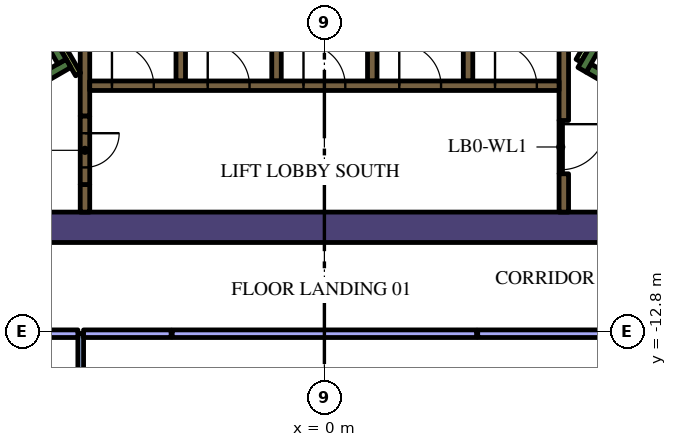
"""IFC4 building model, lengths in metres.
Left out: names, types, materials, properties, quantities, classifications, styles, units other than length and angle.
Written with IfcOpenShell. Run it as: python <this file> out.ifc"""

import sys

from ifc_helpers import new_model, si_unit, direction, frame, frame_2d, origin, place, context, subcontext, project, spatial, rectangle, extrude, element, fill, save


model = new_model("IFC4")
c1 = context("Model", 3, precision=1e-05, world=origin(), true_north=direction((0.0, 1.0)))
c2 = subcontext(c1, "Body", "Model", "MODEL_VIEW")
j1 = project(units=[si_unit("LENGTHUNIT", "METRE"), si_unit("PLANEANGLEUNIT", "RADIAN")], contexts=[c1])
p1 = place(None, origin())
s1 = spatial("IfcSite", under=j1, at=p1, CompositionType="ELEMENT")
p2 = place(p1, origin())
s2 = spatial("IfcBuilding", under=s1, at=p2, CompositionType="ELEMENT")
p3 = place(p2, frame((0.0, 0.0, 166.8)))
s3 = spatial("IfcBuildingStorey", under=s2, at=p3, CompositionType="ELEMENT", Elevation=166.8)
p4 = place(p3, frame((-13.378, -10.05, 0.0), z_axis=(0.0, 0.0, 1.0), x_axis=(1.0, 0.0, 0.0)))
e1 = element("IfcWall", 1, at=p4, inside=s3, PredefinedType="SOLIDWALL", context=c2, shape_type="SweptSolid", body=[
    extrude(rectangle(XDim=22.282, YDim=0.8, at=frame_2d((11.141, 0.0))), origin(), (0.0, 0.0, 1.0), 4.2),
])
p5 = place(p3, frame((12.84, -9.261, 0.0), z_axis=(0.0, 0.0, 1.0), x_axis=(-0.866013990052, 0.500019768644, 0.0)))
e2 = element("IfcWall", 2, at=p5, inside=s3, PredefinedType="SOLIDWALL", context=c2, shape_type="SweptSolid", body=[
    extrude(rectangle(XDim=6.8, YDim=0.25, at=frame_2d((3.4, 0.0))), origin(), (0.0, 0.0, 1.0), 4.2),
])
p6 = place(p3, frame((6.78, -5.906, 0.0), z_axis=(0.0, 0.0, 1.0), x_axis=(0.500223362819, 0.865896406789, 0.0)))
e3 = element("IfcWall", 3, at=p6, inside=s3, PredefinedType="SOLIDWALL", context=c2, shape_type="SweptSolid", body=[
    extrude(rectangle(XDim=0.675, YDim=0.25, at=frame_2d((0.337, 0.0))), origin(), (0.0, 0.0, 1.0), 4.2),
])
p7 = place(p3, frame((-12.84, -9.261, 0.0), z_axis=(0.0, 0.0, 1.0), x_axis=(0.866016039709, 0.500016218704, 0.0)))
e4 = element("IfcWall", 4, at=p7, inside=s3, PredefinedType="SOLIDWALL", context=c2, shape_type="SweptSolid", body=[
    extrude(rectangle(XDim=7.05, YDim=0.25, at=frame_2d((3.525, 0.0))), origin(), (0.0, 0.0, 1.0), 4.2),
])
p8 = place(p3, frame((-6.905, -5.69, 0.0), z_axis=(0.0, 0.0, 1.0), x_axis=(-0.500402024738, 0.865793170242, 0.0)))
e5 = element("IfcWall", 5, at=p8, inside=s3, PredefinedType="SOLIDWALL", context=c2, shape_type="SweptSolid", body=[
    extrude(rectangle(XDim=0.425, YDim=0.25, at=frame_2d((0.212, 0.0))), origin(), (0.0, 0.0, 1.0), 4.2),
])
p9 = place(p3, frame((-6.3, -8.925, 0.0), z_axis=(0.0, 0.0, 1.0), x_axis=(0.0, -1.0, 0.0)))
e6 = element("IfcWall", 6, at=p9, inside=s3, PredefinedType="SOLIDWALL", context=c2, shape_type="SweptSolid", body=[
    extrude(rectangle(XDim=0.725, YDim=0.25, at=frame_2d((0.363, 0.0))), origin(), (0.0, 0.0, 1.0), 4.2),
])
p10 = place(p3, frame((6.3, -7.24, 0.0), z_axis=(0.0, 0.0, 1.0), x_axis=(0.0, 1.0, 0.0)))
e7 = element("IfcWall", 7, at=p10, inside=s3, PredefinedType="SOLIDWALL", context=c2, shape_type="SweptSolid", body=[
    extrude(rectangle(XDim=3.24, YDim=0.25, at=frame_2d((1.62, 0.0))), origin(), (0.0, 0.0, 1.0), 4.2),
])
p11 = place(p3, frame((6.3, -9.65, 0.0), z_axis=(0.0, 0.0, 1.0), x_axis=(0.0, 1.0, 0.0)))
e8 = element("IfcWall", 8, at=p11, inside=s3, PredefinedType="SOLIDWALL", context=c2, shape_type="SweptSolid", body=[
    extrude(rectangle(XDim=1.008, YDim=0.25, at=frame_2d((0.504, 0.0))), origin(), (0.0, 0.0, 1.0), 4.2),
])
for number, where, z_axis, x_axis in (
    (9, (3.78, -4.0, 0.0), (0.0, 0.0, 1.0), (0.0, -1.0, 0.0)),
    (10, (1.26, -4.0, 0.0), (0.0, 0.0, 1.0), (0.0, -1.0, 0.0)),
    (11, (-1.26, -4.0, 0.0), (0.0, 0.0, 1.0), (0.0, -1.0, 0.0)),
    (12, (-3.78, -4.0, 0.0), (0.0, 0.0, 1.0), (0.0, -1.0, 0.0)),
):
    element("IfcWall", number, at=place(p3, frame(where, z_axis=z_axis, x_axis=x_axis)), inside=s3, PredefinedType="SOLIDWALL", context=c2, shape_type="SweptSolid", body=[
        extrude(rectangle(XDim=2.2, YDim=0.25, at=frame_2d((1.1, 0.0))), origin(), (0.0, 0.0, 1.0), 4.2),
    ])
p12 = place(p3, frame((-6.3, -7.125, 0.0), z_axis=(0.0, 0.0, 1.0), x_axis=(0.0, 1.0, 0.0)))
e13 = element("IfcWall", 13, at=p12, inside=s3, PredefinedType="SOLIDWALL", context=c2, shape_type="SweptSolid", body=[
    extrude(rectangle(XDim=3.125, YDim=0.25, at=frame_2d((1.562, 0.0))), origin(), (0.0, 0.0, 1.0), 4.2),
])
p13 = place(p3, frame((-6.48, -6.027, 0.0), z_axis=(0.0, 0.0, 1.0), x_axis=(-0.499927229454, 0.866067413802, 0.0)))
e14 = element("IfcWall", 14, at=p13, inside=s3, PredefinedType="PARTITIONING", context=c2, shape_type="SweptSolid", body=[
    extrude(rectangle(XDim=0.929, YDim=0.15, at=frame_2d((0.464, 0.0))), origin(), (0.0, 0.0, 1.0), 4.2),
])
p14 = place(p3, frame((6.945, -5.222, 0.0), z_axis=(0.0, 0.0, 1.0), x_axis=(-0.499818422106, -0.866130212453, 0.0)))
e15 = element("IfcWall", 15, at=p14, inside=s3, PredefinedType="PARTITIONING", context=c2, shape_type="SweptSolid", body=[
    extrude(rectangle(XDim=0.514, YDim=0.15, at=frame_2d((0.257, 0.0))), origin(), (0.0, 0.0, 1.0), 3.15),
])
p15 = place(p3, frame((-6.175, -6.325, 0.0), z_axis=(0.0, 0.0, 1.0), x_axis=(1.0, 0.0, 0.0)))
e16 = element("IfcWall", 16, at=p15, inside=s3, PredefinedType="SOLIDWALL", context=c2, shape_type="SweptSolid", body=[
    extrude(rectangle(XDim=12.35, YDim=0.25, at=frame_2d((6.175, 0.0))), origin(), (0.0, 0.0, 1.0), 4.2),
])
p16 = place(p15, frame((0.585, 0.0, 0.0)))
e17 = element("IfcOpeningElement", 17, at=p16, cuts=e16, PredefinedType="OPENING", context=c2, shape_type="SweptSolid", body=[
    extrude(rectangle(XDim=1.1, YDim=2.1, at=frame_2d((0.55, 1.05))), frame((0.0, 0.135, 0.0), z_axis=(0.0, -1.0, 0.0), x_axis=(1.0, 0.0, 0.0)), (0.0, 0.0, 1.0), 0.27),
])
p17 = place(p15, frame((3.105, 0.0, 0.0)))
e18 = element("IfcOpeningElement", 18, at=p17, cuts=e16, PredefinedType="OPENING", context=c2, shape_type="SweptSolid", body=[
    extrude(rectangle(XDim=1.1, YDim=2.1, at=frame_2d((0.55, 1.05))), frame((0.0, 0.135, 0.0), z_axis=(0.0, -1.0, 0.0), x_axis=(1.0, 0.0, 0.0)), (0.0, 0.0, 1.0), 0.27),
])
p18 = place(p15, frame((5.625, 0.0, 0.0)))
e19 = element("IfcOpeningElement", 19, at=p18, cuts=e16, PredefinedType="OPENING", context=c2, shape_type="SweptSolid", body=[
    extrude(rectangle(XDim=1.1, YDim=2.1, at=frame_2d((0.55, 1.05))), frame((0.0, 0.135, 0.0), z_axis=(0.0, -1.0, 0.0), x_axis=(1.0, 0.0, 0.0)), (0.0, 0.0, 1.0), 0.27),
])
p19 = place(p15, frame((8.145, 0.0, 0.0)))
e20 = element("IfcOpeningElement", 20, at=p19, cuts=e16, PredefinedType="OPENING", context=c2, shape_type="SweptSolid", body=[
    extrude(rectangle(XDim=1.1, YDim=2.1, at=frame_2d((0.55, 1.05))), frame((0.0, 0.135, 0.0), z_axis=(0.0, -1.0, 0.0), x_axis=(1.0, 0.0, 0.0)), (0.0, 0.0, 1.0), 0.27),
])
p20 = place(p15, frame((10.665, 0.0, 0.0)))
e21 = element("IfcOpeningElement", 21, at=p20, cuts=e16, PredefinedType="OPENING", context=c2, shape_type="SweptSolid", body=[
    extrude(rectangle(XDim=1.1, YDim=2.1, at=frame_2d((0.55, 1.05))), frame((0.0, 0.135, 0.0), z_axis=(0.0, -1.0, 0.0), x_axis=(1.0, 0.0, 0.0)), (0.0, 0.0, 1.0), 0.27),
])
p21 = place(p3, frame((-6.3, -7.125, 0.0), z_axis=(0.0, 0.0, 1.0), x_axis=(0.0, -1.0, 0.0)))
e22 = element("IfcWall", 22, at=p21, inside=s3, PredefinedType="SOLIDWALL", context=c2, shape_type="SweptSolid", body=[
    extrude(rectangle(XDim=1.8, YDim=0.25, at=frame_2d((0.9, 0.0))), origin(), (0.0, 0.0, 1.0), 4.2),
])
p22 = place(p21, frame((0.45, 0.0, 0.0)))
e23 = element("IfcOpeningElement", 23, at=p22, cuts=e22, PredefinedType="OPENING", context=c2, shape_type="SweptSolid", body=[
    extrude(rectangle(XDim=0.9, YDim=2.1, at=frame_2d((0.45, 1.05))), frame((0.0, 0.135, 0.0), z_axis=(0.0, -1.0, 0.0), x_axis=(1.0, 0.0, 0.0)), (0.0, 0.0, 1.0), 0.27),
])
p23 = place(p3, frame((6.22, -7.237, 0.0), z_axis=(0.0, 0.0, 1.0), x_axis=(0.0, -1.0, 0.0)))
e24 = element("IfcWall", 24, at=p23, inside=s3, PredefinedType="PARTITIONING", context=c2, shape_type="SweptSolid", body=[
    extrude(rectangle(XDim=1.4, YDim=0.09, at=frame_2d((0.7, 0.0))), origin(), (0.0, 0.0, 1.0), 3.15),
])
p24 = place(p23, frame((0.1, 0.0, 0.0)))
e25 = element("IfcOpeningElement", 25, at=p24, cuts=e24, PredefinedType="OPENING", context=c2, shape_type="SweptSolid", body=[
    extrude(rectangle(XDim=1.2, YDim=2.1, at=frame_2d((0.6, 1.05))), frame((0.0, 0.055, 0.0), z_axis=(0.0, -1.0, 0.0), x_axis=(1.0, 0.0, 0.0)), (0.0, 0.0, 1.0), 0.11),
])
p25 = place(p3, frame((-6.412, -16.672, 0.0), z_axis=(0.0, 0.0, 1.0), x_axis=(0.0, 1.0, 0.0)))
e26 = element("IfcWall", 26, at=p25, inside=s3, PredefinedType="PARTITIONING", context=c2, shape_type="SweptSolid", body=[
    extrude(rectangle(XDim=3.822, YDim=0.15, at=frame_2d((1.911, 0.0))), origin(), (0.0, 0.0, 1.0), 3.15),
])
p26 = place(p25, frame((1.422, 0.0, 0.0)))
e27 = element("IfcOpeningElement", 27, at=p26, cuts=e26, PredefinedType="OPENING", context=c2, shape_type="SweptSolid", body=[
    extrude(rectangle(XDim=0.9, YDim=2.1, at=frame_2d((0.45, 1.05))), frame((0.0, 0.085, 0.0), z_axis=(0.0, -1.0, 0.0), x_axis=(1.0, 0.0, 0.0)), (0.0, 0.0, 1.0), 0.17),
])
p27 = place(p3, frame((-14.721, -12.85, 0.0), z_axis=(0.0, 0.0, 1.0), x_axis=(1.0, 0.0, 0.0)))
e28 = element("IfcWall", 28, at=p27, inside=s3, PredefinedType="PARTITIONING", context=c2, shape_type="SweptSolid", body=[
    extrude(rectangle(XDim=8.234, YDim=0.2, at=frame_2d((4.117, 0.0))), origin(), (0.0, 0.0, 1.0), 3.15),
])
p28 = place(p3, frame((-4.004, -12.85, 0.0), z_axis=(0.0, 0.0, 1.0), x_axis=(1.0, 0.0, 0.0)))
e29 = element("IfcWall", 29, at=p28, inside=s3, PredefinedType="PARTITIONING", context=c2, shape_type="SweptSolid", body=[
    extrude(rectangle(XDim=8.008, YDim=0.2, at=frame_2d((4.004, 0.0))), origin(), (0.0, 0.0, 1.0), 3.15),
])
p29 = place(p3, frame((-6.337, -12.85, 0.0), z_axis=(0.0, 0.0, 1.0), x_axis=(1.0, 0.0, 0.0)))
e30 = element("IfcWall", 30, at=p29, inside=s3, PredefinedType="PARTITIONING", context=c2, shape_type="SweptSolid", body=[
    extrude(rectangle(XDim=2.303, YDim=0.2, at=frame_2d((1.151, 0.0))), origin(), (0.0, 0.0, 1.0), 3.15),
])
p30 = place(p3, frame((4.034, -12.85, 0.0), z_axis=(0.0, 0.0, 1.0), x_axis=(1.0, 0.0, 0.0)))
e31 = element("IfcWall", 31, at=p30, inside=s3, PredefinedType="PARTITIONING", context=c2, shape_type="SweptSolid", body=[
    extrude(rectangle(XDim=10.717, YDim=0.2, at=frame_2d((5.359, 0.0))), origin(), (0.0, 0.0, 1.0), 3.15),
])
p31 = place(p30, frame((4.9, 0.0, 0.0)))
e32 = element("IfcOpeningElement", 32, at=p31, cuts=e31, PredefinedType="OPENING", context=c2, shape_type="SweptSolid", body=[
    extrude(rectangle(XDim=1.0, YDim=2.1, at=frame_2d((0.5, 1.05))), frame((0.0, 0.11, 0.0), z_axis=(0.0, -1.0, 0.0), x_axis=(1.0, 0.0, 0.0)), (0.0, 0.0, 1.0), 0.22),
])
p32 = place(p16, origin())
e33 = element("IfcDoor", 33, at=p32, inside=s3, OperationType="DOUBLE_DOOR_SLIDING", PredefinedType="DOOR", context=c2, shape_type="SweptSolid", body=[
    extrude(rectangle(XDim=1.1, YDim=2.1, at=frame_2d((0.55, 1.05))), frame((0.0, 0.025, 0.0), z_axis=(0.0, -1.0, 0.0), x_axis=(1.0, 0.0, 0.0)), (0.0, 0.0, 1.0), 0.05),
])
fill(e17, e33)
p33 = place(p17, origin())
e34 = element("IfcDoor", 34, at=p33, inside=s3, OperationType="DOUBLE_DOOR_SLIDING", PredefinedType="DOOR", context=c2, shape_type="SweptSolid", body=[
    extrude(rectangle(XDim=1.1, YDim=2.1, at=frame_2d((0.55, 1.05))), frame((0.0, 0.025, 0.0), z_axis=(0.0, -1.0, 0.0), x_axis=(1.0, 0.0, 0.0)), (0.0, 0.0, 1.0), 0.05),
])
fill(e18, e34)
p34 = place(p18, origin())
e35 = element("IfcDoor", 35, at=p34, inside=s3, OperationType="DOUBLE_DOOR_SLIDING", PredefinedType="DOOR", context=c2, shape_type="SweptSolid", body=[
    extrude(rectangle(XDim=1.1, YDim=2.1, at=frame_2d((0.55, 1.05))), frame((0.0, 0.025, 0.0), z_axis=(0.0, -1.0, 0.0), x_axis=(1.0, 0.0, 0.0)), (0.0, 0.0, 1.0), 0.05),
])
fill(e19, e35)
p35 = place(p19, origin())
e36 = element("IfcDoor", 36, at=p35, inside=s3, OperationType="DOUBLE_DOOR_SLIDING", PredefinedType="DOOR", context=c2, shape_type="SweptSolid", body=[
    extrude(rectangle(XDim=1.1, YDim=2.1, at=frame_2d((0.55, 1.05))), frame((0.0, 0.025, 0.0), z_axis=(0.0, -1.0, 0.0), x_axis=(1.0, 0.0, 0.0)), (0.0, 0.0, 1.0), 0.05),
])
fill(e20, e36)
p36 = place(p20, origin())
e37 = element("IfcDoor", 37, at=p36, inside=s3, OperationType="DOUBLE_DOOR_SLIDING", PredefinedType="DOOR", context=c2, shape_type="SweptSolid", body=[
    extrude(rectangle(XDim=1.1, YDim=2.1, at=frame_2d((0.55, 1.05))), frame((0.0, 0.025, 0.0), z_axis=(0.0, -1.0, 0.0), x_axis=(1.0, 0.0, 0.0)), (0.0, 0.0, 1.0), 0.05),
])
fill(e21, e37)
p37 = place(p22, origin())
e38 = element("IfcDoor", 38, at=p37, inside=s3, OperationType="SINGLE_SWING_LEFT", PredefinedType="DOOR", context=c2, shape_type="SweptSolid", body=[
    extrude(rectangle(XDim=0.9, YDim=2.1, at=frame_2d((0.45, 1.05))), frame((0.0, 0.025, 0.0), z_axis=(0.0, -1.0, 0.0), x_axis=(1.0, 0.0, 0.0)), (0.0, 0.0, 1.0), 0.05),
])
fill(e23, e38)
p38 = place(p24, origin())
e39 = element("IfcDoor", 39, at=p38, inside=s3, OperationType="SINGLE_SWING_LEFT", PredefinedType="DOOR", context=c2, shape_type="SweptSolid", body=[
    extrude(rectangle(XDim=1.2, YDim=2.1, at=frame_2d((0.6, 1.05))), frame((0.0, 0.025, 0.0), z_axis=(0.0, -1.0, 0.0), x_axis=(1.0, 0.0, 0.0)), (0.0, 0.0, 1.0), 0.05),
])
fill(e25, e39)
save(model, sys.argv[1])
